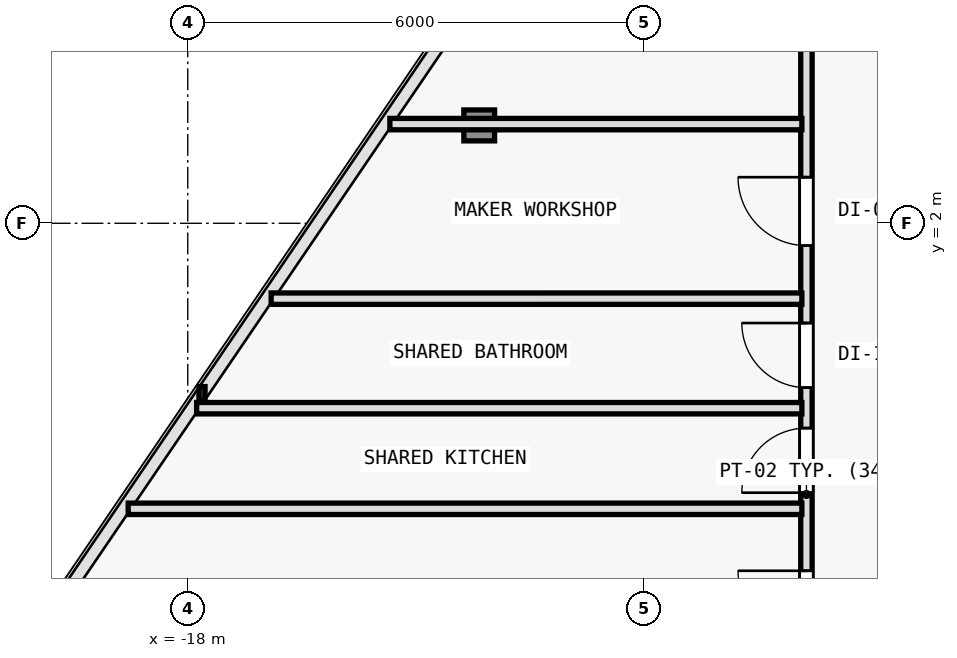
"""IFC4 building model, lengths in metres.
Left out: names, types, materials, properties, quantities, classifications, styles, units other than length and angle.
Written with IfcOpenShell. Run it as: python <this file> out.ifc"""

import sys

from ifc_helpers import new_model, si_unit, direction, frame, frame_2d, origin, origin_2d, place, context, subcontext, project, spatial, rectangle, i_section, extrude, element, fill, save


model = new_model("IFC4")
c1 = context("Model", 3, precision=1e-05, world=origin(), true_north=direction((0.0, 1.0)))
c2 = subcontext(c1, "Body", "Model", "MODEL_VIEW")
j1 = project(units=[si_unit("LENGTHUNIT", "METRE"), si_unit("PLANEANGLEUNIT", "RADIAN")], contexts=[c1])
p1 = place(None, origin())
s1 = spatial("IfcSite", under=j1, at=p1, CompositionType="ELEMENT")
p2 = place(p1, origin())
s2 = spatial("IfcBuilding", under=s1, at=p2, CompositionType="ELEMENT")
p3 = place(p2, frame((0.0, 0.0, 149.4)))
s3 = spatial("IfcBuildingStorey", under=s2, at=p3, CompositionType="ELEMENT", Elevation=149.4)
p4 = place(p3, frame((-14.165, 3.288, 0.006), z_axis=(0.017071567417, 0.009521989794, 0.999808928394), x_axis=(-0.487119351792, 0.873335409284, 0.0)))
e1 = element("IfcColumn", 1, at=p4, inside=s3, PredefinedType="COLUMN", context=c2, shape_type="SweptSolid", body=[
    extrude(i_section(OverallWidth=0.404, OverallDepth=0.407, WebThickness=0.017, FlangeThickness=0.028, FilletRadius=0.015, at=origin_2d()), origin(), (0.0, 0.0, 1.0), 3.59),
])
p5 = place(p3, frame((-9.86, -11.56, 0.0), z_axis=(0.0, 0.0, 1.0), x_axis=(0.0, 1.0, 0.0)))
e2 = element("IfcWall", 2, at=p5, inside=s3, PredefinedType="PARTITIONING", context=c2, shape_type="SweptSolid", body=[
    extrude(rectangle(XDim=19.986, YDim=0.15, at=frame_2d((9.993, 0.0))), origin(), (0.0, 0.0, 1.0), 2.775),
])
p6 = place(p5, frame((11.398, 0.0, 0.0)))
e3 = element("IfcOpeningElement", 3, at=p6, cuts=e2, PredefinedType="OPENING", context=c2, shape_type="SweptSolid", body=[
    extrude(rectangle(XDim=0.85, YDim=2.1, at=frame_2d((0.425, 1.05))), frame((0.0, 0.085, 0.0), z_axis=(0.0, -1.0, 0.0), x_axis=(1.0, 0.0, 0.0)), (0.0, 0.0, 1.0), 0.17),
])
p7 = place(p5, frame((10.015, 0.0, 0.0)))
e4 = element("IfcOpeningElement", 4, at=p7, cuts=e2, PredefinedType="OPENING", context=c2, shape_type="SweptSolid", body=[
    extrude(rectangle(XDim=0.85, YDim=2.1, at=frame_2d((0.425, 1.05))), frame((0.0, 0.085, 0.0), z_axis=(0.0, -1.0, 0.0), x_axis=(1.0, 0.0, 0.0)), (0.0, 0.0, 1.0), 0.17),
])
p8 = place(p5, frame((8.088, 0.0, 0.0)))
e5 = element("IfcOpeningElement", 5, at=p8, cuts=e2, PredefinedType="OPENING", context=c2, shape_type="SweptSolid", body=[
    extrude(rectangle(XDim=0.9, YDim=2.1, at=frame_2d((0.45, 1.05))), frame((0.0, 0.085, 0.0), z_axis=(0.0, -1.0, 0.0), x_axis=(1.0, 0.0, 0.0)), (0.0, 0.0, 1.0), 0.17),
])
p9 = place(p5, frame((5.324, 0.0, 0.0)))
e6 = element("IfcOpeningElement", 6, at=p9, cuts=e2, PredefinedType="OPENING", context=c2, shape_type="SweptSolid", body=[
    extrude(rectangle(XDim=0.9, YDim=2.1, at=frame_2d((0.45, 1.05))), frame((0.0, 0.085, 0.0), z_axis=(0.0, -1.0, 0.0), x_axis=(1.0, 0.0, 0.0)), (0.0, 0.0, 1.0), 0.17),
])
p10 = place(p5, frame((1.776, 0.0, 0.0)))
e7 = element("IfcOpeningElement", 7, at=p10, cuts=e2, PredefinedType="OPENING", context=c2, shape_type="SweptSolid", body=[
    extrude(rectangle(XDim=0.9, YDim=2.1, at=frame_2d((0.45, 1.05))), frame((0.0, 0.085, 0.0), z_axis=(0.0, -1.0, 0.0), x_axis=(1.0, 0.0, 0.0)), (0.0, 0.0, 1.0), 0.17),
])
p11 = place(p5, frame((13.266, 0.0, 0.0)))
e8 = element("IfcOpeningElement", 8, at=p11, cuts=e2, PredefinedType="OPENING", context=c2, shape_type="SweptSolid", body=[
    extrude(rectangle(XDim=0.9, YDim=2.1, at=frame_2d((0.45, 1.05))), frame((0.0, 0.085, 0.0), z_axis=(0.0, -1.0, 0.0), x_axis=(1.0, 0.0, 0.0)), (0.0, 0.0, 1.0), 0.17),
])
p12 = place(p3, frame((-9.92, 3.305, 0.0), z_axis=(0.0, 0.0, 1.0), x_axis=(-1.0, 0.0, 0.0)))
e9 = element("IfcWall", 9, at=p12, inside=s3, PredefinedType="PARTITIONING", context=c2, shape_type="SweptSolid", body=[
    extrude(rectangle(XDim=5.421, YDim=0.15, at=frame_2d((2.71, 0.0))), origin(), (0.0, 0.0, 1.0), 2.885),
])
p13 = place(p3, frame((-9.92, -1.757, 0.0), z_axis=(0.0, 0.0, 1.0), x_axis=(-1.0, 0.0, 0.0)))
e10 = element("IfcWall", 10, at=p13, inside=s3, PredefinedType="PARTITIONING", context=c2, shape_type="SweptSolid", body=[
    extrude(rectangle(XDim=8.864, YDim=0.15, at=frame_2d((4.432, 0.0))), origin(), (0.0, 0.0, 1.0), 2.885),
])
p14 = place(p3, frame((-9.92, 1.008, 0.0), z_axis=(0.0, 0.0, 1.0), x_axis=(-1.0, 0.0, 0.0)))
e11 = element("IfcWall", 11, at=p14, inside=s3, PredefinedType="PARTITIONING", context=c2, shape_type="SweptSolid", body=[
    extrude(rectangle(XDim=6.983, YDim=0.15, at=frame_2d((3.491, 0.0))), origin(), (0.0, 0.0, 1.0), 2.885),
])
p15 = place(p3, frame((-9.92, -0.433, 0.0), z_axis=(0.0, 0.0, 1.0), x_axis=(-1.0, 0.0, 0.0)))
e12 = element("IfcWall", 12, at=p15, inside=s3, PredefinedType="PARTITIONING", context=c2, shape_type="SweptSolid", body=[
    extrude(rectangle(XDim=7.963, YDim=0.15, at=frame_2d((3.981, 0.0))), origin(), (0.0, 0.0, 1.0), 2.885),
])
p16 = place(p6, origin())
e13 = element("IfcDoor", 13, at=p16, inside=s3, OperationType="SINGLE_SWING_RIGHT", PredefinedType="DOOR", context=c2, shape_type="SweptSolid", body=[
    extrude(rectangle(XDim=0.85, YDim=2.1, at=frame_2d((0.425, 1.05))), frame((0.0, 0.025, 0.0), z_axis=(0.0, -1.0, 0.0), x_axis=(1.0, 0.0, 0.0)), (0.0, 0.0, 1.0), 0.05),
])
fill(e3, e13)
p17 = place(p7, origin())
e14 = element("IfcDoor", 14, at=p17, inside=s3, OperationType="SINGLE_SWING_LEFT", PredefinedType="DOOR", context=c2, shape_type="SweptSolid", body=[
    extrude(rectangle(XDim=0.85, YDim=2.1, at=frame_2d((0.425, 1.05))), frame((0.0, 0.025, 0.0), z_axis=(0.0, -1.0, 0.0), x_axis=(1.0, 0.0, 0.0)), (0.0, 0.0, 1.0), 0.05),
])
fill(e4, e14)
p18 = place(p8, origin())
e15 = element("IfcDoor", 15, at=p18, inside=s3, OperationType="SINGLE_SWING_RIGHT", PredefinedType="DOOR", context=c2, shape_type="SweptSolid", body=[
    extrude(rectangle(XDim=0.9, YDim=2.1, at=frame_2d((0.45, 1.05))), frame((0.0, 0.025, 0.0), z_axis=(0.0, -1.0, 0.0), x_axis=(1.0, 0.0, 0.0)), (0.0, 0.0, 1.0), 0.05),
])
fill(e5, e15)
p19 = place(p11, origin())
e16 = element("IfcDoor", 16, at=p19, inside=s3, OperationType="SINGLE_SWING_RIGHT", PredefinedType="DOOR", context=c2, shape_type="SweptSolid", body=[
    extrude(rectangle(XDim=0.9, YDim=2.1, at=frame_2d((0.45, 1.05))), frame((0.0, 0.025, 0.0), z_axis=(0.0, -1.0, 0.0), x_axis=(1.0, 0.0, 0.0)), (0.0, 0.0, 1.0), 0.05),
])
fill(e8, e16)
save(model, sys.argv[1])
